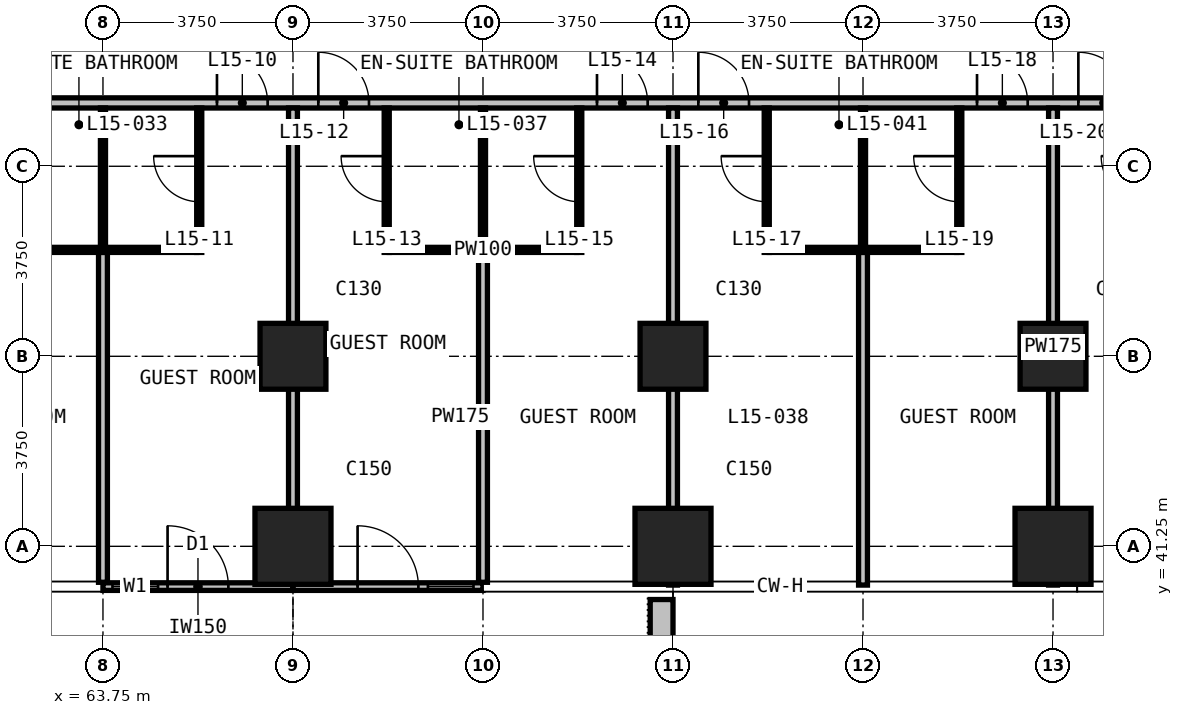
"""IFC4 building model, lengths in metres.
Left out: names, types, materials, properties, quantities, classifications, styles, units other than length and angle.
Written with IfcOpenShell. Run it as: python <this file> out.ifc"""

import sys

from ifc_helpers import new_model, si_unit, direction, frame, frame_2d, origin, origin_2d, place, context, subcontext, project, spatial, rectangle, extrude, element, fill, save


model = new_model("IFC4")
c1 = context("Model", 3, precision=1e-05, world=origin(), true_north=direction((0.0, 1.0)))
c2 = subcontext(c1, "Body", "Model", "MODEL_VIEW")
j1 = project(units=[si_unit("LENGTHUNIT", "METRE"), si_unit("PLANEANGLEUNIT", "RADIAN")], contexts=[c1])
p1 = place(None, origin())
s1 = spatial("IfcSite", under=j1, at=p1, CompositionType="ELEMENT")
p2 = place(p1, origin())
s2 = spatial("IfcBuilding", under=s1, at=p2, CompositionType="ELEMENT")
p3 = place(p2, frame((0.0, 0.0, 69.2)))
s3 = spatial("IfcBuildingStorey", under=s2, at=p3, CompositionType="ELEMENT", Elevation=69.2)
p4 = place(p3, frame((67.5, 41.25, 0.0), z_axis=(0.0, 0.0, 1.0), x_axis=(1.0, 0.0, 0.0)))
e1 = element("IfcColumn", 1, at=p4, inside=s3, PredefinedType="COLUMN", context=c2, shape_type="SweptSolid", body=[
    extrude(rectangle(XDim=1.5, YDim=1.5, at=origin_2d()), origin(), (0.0, 0.0, 1.0), 3.3),
])
p5 = place(p3, frame((67.5, 45.0, 0.0), z_axis=(0.0, 0.0, 1.0), x_axis=(1.0, 0.0, 0.0)))
e2 = element("IfcColumn", 2, at=p5, inside=s3, PredefinedType="COLUMN", context=c2, shape_type="SweptSolid", body=[
    extrude(rectangle(XDim=1.3, YDim=1.3, at=origin_2d()), origin(), (0.0, 0.0, 1.0), 3.3),
])
p6 = place(p3, frame((75.0, 41.25, 0.0), z_axis=(0.0, 0.0, 1.0), x_axis=(1.0, 0.0, 0.0)))
e3 = element("IfcColumn", 3, at=p6, inside=s3, PredefinedType="COLUMN", context=c2, shape_type="SweptSolid", body=[
    extrude(rectangle(XDim=1.5, YDim=1.5, at=origin_2d()), origin(), (0.0, 0.0, 1.0), 3.3),
])
p7 = place(p3, frame((75.0, 45.0, 0.0), z_axis=(0.0, 0.0, 1.0), x_axis=(1.0, 0.0, 0.0)))
e4 = element("IfcColumn", 4, at=p7, inside=s3, PredefinedType="COLUMN", context=c2, shape_type="SweptSolid", body=[
    extrude(rectangle(XDim=1.3, YDim=1.3, at=origin_2d()), origin(), (0.0, 0.0, 1.0), 3.3),
])
p8 = place(p3, frame((82.5, 41.25, 0.0), z_axis=(0.0, 0.0, 1.0), x_axis=(1.0, 0.0, 0.0)))
e5 = element("IfcColumn", 5, at=p8, inside=s3, PredefinedType="COLUMN", context=c2, shape_type="SweptSolid", body=[
    extrude(rectangle(XDim=1.5, YDim=1.5, at=origin_2d()), origin(), (0.0, 0.0, 1.0), 3.3),
])
p9 = place(p3, frame((82.5, 45.0, 0.0), z_axis=(0.0, 0.0, 1.0), x_axis=(1.0, 0.0, 0.0)))
e6 = element("IfcColumn", 6, at=p9, inside=s3, PredefinedType="COLUMN", context=c2, shape_type="SweptSolid", body=[
    extrude(rectangle(XDim=1.3, YDim=1.3, at=origin_2d()), origin(), (0.0, 0.0, 1.0), 3.3),
])
p10 = place(p3, frame((63.75, 40.455, 0.0), z_axis=(0.0, 0.0, 1.0), x_axis=(1.0, 0.0, 0.0)))
e7 = element("IfcWall", 7, at=p10, inside=s3, PredefinedType="SOLIDWALL", context=c2, shape_type="SweptSolid", body=[
    extrude(rectangle(XDim=3.75, YDim=0.15, at=frame_2d((1.875, 0.0))), origin(), (0.0, 0.0, 1.0), 3.0),
])
p11 = place(p10, frame((0.188, 0.0, 0.1)))
e8 = element("IfcOpeningElement", 8, at=p11, cuts=e7, PredefinedType="OPENING", context=c2, shape_type="SweptSolid", body=[
    extrude(rectangle(XDim=0.9, YDim=2.4, at=frame_2d((0.45, 1.2))), frame((0.0, 0.085, 0.0), z_axis=(0.0, -1.0, 0.0), x_axis=(1.0, 0.0, 0.0)), (0.0, 0.0, 1.0), 0.17),
])
p12 = place(p10, frame((1.275, 0.0, 0.0)))
e9 = element("IfcOpeningElement", 9, at=p12, cuts=e7, PredefinedType="OPENING", context=c2, shape_type="SweptSolid", body=[
    extrude(rectangle(XDim=1.2, YDim=2.4, at=frame_2d((0.6, 1.2))), frame((0.0, 0.085, 0.0), z_axis=(0.0, -1.0, 0.0), x_axis=(1.0, 0.0, 0.0)), (0.0, 0.0, 1.0), 0.17),
])
p13 = place(p3, frame((67.5, 40.455, 0.0), z_axis=(0.0, 0.0, 1.0), x_axis=(1.0, 0.0, 0.0)))
e10 = element("IfcWall", 10, at=p13, inside=s3, PredefinedType="SOLIDWALL", context=c2, shape_type="SweptSolid", body=[
    extrude(rectangle(XDim=3.75, YDim=0.15, at=frame_2d((1.875, 0.0))), origin(), (0.0, 0.0, 1.0), 3.0),
])
p14 = place(p13, frame((1.275, 0.0, 0.0)))
e11 = element("IfcOpeningElement", 11, at=p14, cuts=e10, PredefinedType="OPENING", context=c2, shape_type="SweptSolid", body=[
    extrude(rectangle(XDim=1.2, YDim=2.4, at=frame_2d((0.6, 1.2))), frame((0.0, 0.085, 0.0), z_axis=(0.0, -1.0, 0.0), x_axis=(1.0, 0.0, 0.0)), (0.0, 0.0, 1.0), 0.17),
])
p15 = place(p13, frame((2.663, 0.0, 0.1)))
e12 = element("IfcOpeningElement", 12, at=p15, cuts=e10, PredefinedType="OPENING", context=c2, shape_type="SweptSolid", body=[
    extrude(rectangle(XDim=0.9, YDim=2.4, at=frame_2d((0.45, 1.2))), frame((0.0, 0.085, 0.0), z_axis=(0.0, -1.0, 0.0), x_axis=(1.0, 0.0, 0.0)), (0.0, 0.0, 1.0), 0.17),
])
p16 = place(p3, frame((74.775, 40.2, 0.0), z_axis=(0.0, 0.0, 1.0), x_axis=(0.0, -1.0, 0.0)))
e13 = element("IfcWall", 13, at=p16, inside=s3, PredefinedType="USERDEFINED", context=c2, shape_type="SweptSolid", body=[
    extrude(rectangle(XDim=2.35, YDim=0.45, at=frame_2d((1.175, 0.0))), origin(), (0.0, 0.0, 1.0), 1.1),
])
p17 = place(p3, frame((52.575, 50.0, 0.0), z_axis=(0.0, 0.0, 1.0), x_axis=(1.0, 0.0, 0.0)))
e14 = element("IfcWall", 14, at=p17, inside=s3, PredefinedType="PARTITIONING", context=c2, shape_type="SweptSolid", body=[
    extrude(rectangle(XDim=44.85, YDim=0.2, at=frame_2d((22.425, 0.0))), origin(), (0.0, 0.0, 1.0), 3.0),
])
p18 = place(p17, frame((5.925, 0.0, 0.0)))
e15 = element("IfcOpeningElement", 15, at=p18, cuts=e14, PredefinedType="OPENING", context=c2, shape_type="SweptSolid", body=[
    extrude(rectangle(XDim=1.0, YDim=2.2, at=frame_2d((0.5, 1.1))), frame((0.0, 0.11, 0.0), z_axis=(0.0, -1.0, 0.0), x_axis=(1.0, 0.0, 0.0)), (0.0, 0.0, 1.0), 0.22),
])
p19 = place(p17, frame((7.925, 0.0, 0.0)))
e16 = element("IfcOpeningElement", 16, at=p19, cuts=e14, PredefinedType="OPENING", context=c2, shape_type="SweptSolid", body=[
    extrude(rectangle(XDim=1.0, YDim=2.2, at=frame_2d((0.5, 1.1))), frame((0.0, 0.11, 0.0), z_axis=(0.0, -1.0, 0.0), x_axis=(1.0, 0.0, 0.0)), (0.0, 0.0, 1.0), 0.22),
])
p20 = place(p17, frame((13.425, 0.0, 0.0)))
e17 = element("IfcOpeningElement", 17, at=p20, cuts=e14, PredefinedType="OPENING", context=c2, shape_type="SweptSolid", body=[
    extrude(rectangle(XDim=1.0, YDim=2.2, at=frame_2d((0.5, 1.1))), frame((0.0, 0.11, 0.0), z_axis=(0.0, -1.0, 0.0), x_axis=(1.0, 0.0, 0.0)), (0.0, 0.0, 1.0), 0.22),
])
p21 = place(p17, frame((15.425, 0.0, 0.0)))
e18 = element("IfcOpeningElement", 18, at=p21, cuts=e14, PredefinedType="OPENING", context=c2, shape_type="SweptSolid", body=[
    extrude(rectangle(XDim=1.0, YDim=2.2, at=frame_2d((0.5, 1.1))), frame((0.0, 0.11, 0.0), z_axis=(0.0, -1.0, 0.0), x_axis=(1.0, 0.0, 0.0)), (0.0, 0.0, 1.0), 0.22),
])
p22 = place(p17, frame((20.925, 0.0, 0.0)))
e19 = element("IfcOpeningElement", 19, at=p22, cuts=e14, PredefinedType="OPENING", context=c2, shape_type="SweptSolid", body=[
    extrude(rectangle(XDim=1.0, YDim=2.2, at=frame_2d((0.5, 1.1))), frame((0.0, 0.11, 0.0), z_axis=(0.0, -1.0, 0.0), x_axis=(1.0, 0.0, 0.0)), (0.0, 0.0, 1.0), 0.22),
])
p23 = place(p17, frame((22.925, 0.0, 0.0)))
e20 = element("IfcOpeningElement", 20, at=p23, cuts=e14, PredefinedType="OPENING", context=c2, shape_type="SweptSolid", body=[
    extrude(rectangle(XDim=1.0, YDim=2.2, at=frame_2d((0.5, 1.1))), frame((0.0, 0.11, 0.0), z_axis=(0.0, -1.0, 0.0), x_axis=(1.0, 0.0, 0.0)), (0.0, 0.0, 1.0), 0.22),
])
p24 = place(p17, frame((28.425, 0.0, 0.0)))
e21 = element("IfcOpeningElement", 21, at=p24, cuts=e14, PredefinedType="OPENING", context=c2, shape_type="SweptSolid", body=[
    extrude(rectangle(XDim=1.0, YDim=2.2, at=frame_2d((0.5, 1.1))), frame((0.0, 0.11, 0.0), z_axis=(0.0, -1.0, 0.0), x_axis=(1.0, 0.0, 0.0)), (0.0, 0.0, 1.0), 0.22),
])
p25 = place(p17, frame((30.425, 0.0, 0.0)))
e22 = element("IfcOpeningElement", 22, at=p25, cuts=e14, PredefinedType="OPENING", context=c2, shape_type="SweptSolid", body=[
    extrude(rectangle(XDim=1.0, YDim=2.2, at=frame_2d((0.5, 1.1))), frame((0.0, 0.11, 0.0), z_axis=(0.0, -1.0, 0.0), x_axis=(1.0, 0.0, 0.0)), (0.0, 0.0, 1.0), 0.22),
])
p26 = place(p17, frame((35.925, 0.0, 0.0)))
e23 = element("IfcOpeningElement", 23, at=p26, cuts=e14, PredefinedType="OPENING", context=c2, shape_type="SweptSolid", body=[
    extrude(rectangle(XDim=1.0, YDim=2.2, at=frame_2d((0.5, 1.1))), frame((0.0, 0.11, 0.0), z_axis=(0.0, -1.0, 0.0), x_axis=(1.0, 0.0, 0.0)), (0.0, 0.0, 1.0), 0.22),
])
p27 = place(p17, frame((37.925, 0.0, 0.0)))
e24 = element("IfcOpeningElement", 24, at=p27, cuts=e14, PredefinedType="OPENING", context=c2, shape_type="SweptSolid", body=[
    extrude(rectangle(XDim=1.0, YDim=2.2, at=frame_2d((0.5, 1.1))), frame((0.0, 0.11, 0.0), z_axis=(0.0, -1.0, 0.0), x_axis=(1.0, 0.0, 0.0)), (0.0, 0.0, 1.0), 0.22),
])
p28 = place(p17, frame((1.4, 0.0, 0.0)))
e25 = element("IfcOpeningElement", 25, at=p28, cuts=e14, PredefinedType="OPENING", context=c2, shape_type="SweptSolid", body=[
    extrude(rectangle(XDim=0.9, YDim=2.2, at=frame_2d((0.45, 1.1))), frame((0.0, 0.11, 0.0), z_axis=(0.0, -1.0, 0.0), x_axis=(1.0, 0.0, 0.0)), (0.0, 0.0, 1.0), 0.22),
])
p29 = place(p17, frame((42.575, 0.0, 0.0)))
e26 = element("IfcOpeningElement", 26, at=p29, cuts=e14, PredefinedType="OPENING", context=c2, shape_type="SweptSolid", body=[
    extrude(rectangle(XDim=0.9, YDim=2.2, at=frame_2d((0.45, 1.1))), frame((0.0, 0.11, 0.0), z_axis=(0.0, -1.0, 0.0), x_axis=(1.0, 0.0, 0.0)), (0.0, 0.0, 1.0), 0.22),
])
p30 = place(p3, frame((63.75, 40.54, 0.0), z_axis=(0.0, 0.0, 1.0), x_axis=(0.0, 1.0, 0.0)))
e27 = element("IfcWall", 27, at=p30, inside=s3, PredefinedType="PARTITIONING", context=c2, shape_type="SweptSolid", body=[
    extrude(rectangle(XDim=6.51, YDim=0.175, at=frame_2d((3.255, 0.0))), origin(), (0.0, 0.0, 1.0), 3.0),
])
p31 = place(p3, frame((67.5, 40.54, 0.0), z_axis=(0.0, 0.0, 1.0), x_axis=(0.0, 1.0, 0.0)))
e28 = element("IfcWall", 28, at=p31, inside=s3, PredefinedType="PARTITIONING", context=c2, shape_type="SweptSolid", body=[
    extrude(rectangle(XDim=9.36, YDim=0.175, at=frame_2d((4.68, 0.0))), origin(), (0.0, 0.0, 1.0), 3.0),
])
p32 = place(p3, frame((71.25, 40.54, 0.0), z_axis=(0.0, 0.0, 1.0), x_axis=(0.0, 1.0, 0.0)))
e29 = element("IfcWall", 29, at=p32, inside=s3, PredefinedType="PARTITIONING", context=c2, shape_type="SweptSolid", body=[
    extrude(rectangle(XDim=6.51, YDim=0.175, at=frame_2d((3.255, 0.0))), origin(), (0.0, 0.0, 1.0), 3.0),
])
p33 = place(p3, frame((75.0, 40.485, 0.0), z_axis=(0.0, 0.0, 1.0), x_axis=(0.0, 1.0, 0.0)))
e30 = element("IfcWall", 30, at=p33, inside=s3, PredefinedType="PARTITIONING", context=c2, shape_type="SweptSolid", body=[
    extrude(rectangle(XDim=9.415, YDim=0.175, at=frame_2d((4.708, 0.0))), origin(), (0.0, 0.0, 1.0), 3.0),
])
p34 = place(p3, frame((78.75, 40.485, 0.0), z_axis=(0.0, 0.0, 1.0), x_axis=(0.0, 1.0, 0.0)))
e31 = element("IfcWall", 31, at=p34, inside=s3, PredefinedType="PARTITIONING", context=c2, shape_type="SweptSolid", body=[
    extrude(rectangle(XDim=6.565, YDim=0.175, at=frame_2d((3.282, 0.0))), origin(), (0.0, 0.0, 1.0), 3.0),
])
p35 = place(p3, frame((82.5, 40.485, 0.0), z_axis=(0.0, 0.0, 1.0), x_axis=(0.0, 1.0, 0.0)))
e32 = element("IfcWall", 32, at=p35, inside=s3, PredefinedType="PARTITIONING", context=c2, shape_type="SweptSolid", body=[
    extrude(rectangle(XDim=9.415, YDim=0.175, at=frame_2d((4.708, 0.0))), origin(), (0.0, 0.0, 1.0), 3.0),
])
for number, where, z_axis, x_axis in (
    (33, (61.9, 47.1, 0.0), (0.0, 0.0, 1.0), (1.0, 0.0, 0.0)),
    (34, (69.4, 47.1, 0.0), (0.0, 0.0, 1.0), (1.0, 0.0, 0.0)),
    (35, (76.9, 47.1, 0.0), (0.0, 0.0, 1.0), (1.0, 0.0, 0.0)),
):
    element("IfcWall", number, at=place(p3, frame(where, z_axis=z_axis, x_axis=x_axis)), inside=s3, PredefinedType="PARTITIONING", context=c2, shape_type="SweptSolid", body=[
        extrude(rectangle(XDim=3.7, YDim=0.1, at=frame_2d((1.85, 0.0))), origin(), (0.0, 0.0, 1.0), 3.0),
    ])
p36 = place(p3, frame((63.75, 47.15, 0.0), z_axis=(0.0, 0.0, 1.0), x_axis=(0.0, 1.0, 0.0)))
e36 = element("IfcWall", 36, at=p36, inside=s3, PredefinedType="PARTITIONING", context=c2, shape_type="SweptSolid", body=[
    extrude(rectangle(XDim=2.75, YDim=0.1, at=frame_2d((1.375, 0.0))), origin(), (0.0, 0.0, 1.0), 3.0),
])
p37 = place(p3, frame((65.65, 47.05, 0.0), z_axis=(0.0, 0.0, 1.0), x_axis=(0.0, 1.0, 0.0)))
e37 = element("IfcWall", 37, at=p37, inside=s3, PredefinedType="PARTITIONING", context=c2, shape_type="SweptSolid", body=[
    extrude(rectangle(XDim=2.85, YDim=0.1, at=frame_2d((1.425, 0.0))), origin(), (0.0, 0.0, 1.0), 3.0),
])
p38 = place(p37, frame((1.0, 0.0, 0.0)))
e38 = element("IfcOpeningElement", 38, at=p38, cuts=e37, PredefinedType="OPENING", context=c2, shape_type="SweptSolid", body=[
    extrude(rectangle(XDim=0.9, YDim=2.2, at=frame_2d((0.45, 1.1))), frame((0.0, 0.06, 0.0), z_axis=(0.0, -1.0, 0.0), x_axis=(1.0, 0.0, 0.0)), (0.0, 0.0, 1.0), 0.12),
])
p39 = place(p3, frame((69.35, 47.05, 0.0), z_axis=(0.0, 0.0, 1.0), x_axis=(0.0, 1.0, 0.0)))
e39 = element("IfcWall", 39, at=p39, inside=s3, PredefinedType="PARTITIONING", context=c2, shape_type="SweptSolid", body=[
    extrude(rectangle(XDim=2.85, YDim=0.1, at=frame_2d((1.425, 0.0))), origin(), (0.0, 0.0, 1.0), 3.0),
])
p40 = place(p39, frame((1.0, 0.0, 0.0)))
e40 = element("IfcOpeningElement", 40, at=p40, cuts=e39, PredefinedType="OPENING", context=c2, shape_type="SweptSolid", body=[
    extrude(rectangle(XDim=0.9, YDim=2.2, at=frame_2d((0.45, 1.1))), frame((0.0, 0.06, 0.0), z_axis=(0.0, -1.0, 0.0), x_axis=(1.0, 0.0, 0.0)), (0.0, 0.0, 1.0), 0.12),
])
p41 = place(p3, frame((71.25, 47.15, 0.0), z_axis=(0.0, 0.0, 1.0), x_axis=(0.0, 1.0, 0.0)))
e41 = element("IfcWall", 41, at=p41, inside=s3, PredefinedType="PARTITIONING", context=c2, shape_type="SweptSolid", body=[
    extrude(rectangle(XDim=2.75, YDim=0.1, at=frame_2d((1.375, 0.0))), origin(), (0.0, 0.0, 1.0), 3.0),
])
p42 = place(p3, frame((73.15, 47.05, 0.0), z_axis=(0.0, 0.0, 1.0), x_axis=(0.0, 1.0, 0.0)))
e42 = element("IfcWall", 42, at=p42, inside=s3, PredefinedType="PARTITIONING", context=c2, shape_type="SweptSolid", body=[
    extrude(rectangle(XDim=2.85, YDim=0.1, at=frame_2d((1.425, 0.0))), origin(), (0.0, 0.0, 1.0), 3.0),
])
p43 = place(p42, frame((1.0, 0.0, 0.0)))
e43 = element("IfcOpeningElement", 43, at=p43, cuts=e42, PredefinedType="OPENING", context=c2, shape_type="SweptSolid", body=[
    extrude(rectangle(XDim=0.9, YDim=2.2, at=frame_2d((0.45, 1.1))), frame((0.0, 0.06, 0.0), z_axis=(0.0, -1.0, 0.0), x_axis=(1.0, 0.0, 0.0)), (0.0, 0.0, 1.0), 0.12),
])
p44 = place(p3, frame((76.85, 47.05, 0.0), z_axis=(0.0, 0.0, 1.0), x_axis=(0.0, 1.0, 0.0)))
e44 = element("IfcWall", 44, at=p44, inside=s3, PredefinedType="PARTITIONING", context=c2, shape_type="SweptSolid", body=[
    extrude(rectangle(XDim=2.85, YDim=0.1, at=frame_2d((1.425, 0.0))), origin(), (0.0, 0.0, 1.0), 3.0),
])
p45 = place(p44, frame((1.0, 0.0, 0.0)))
e45 = element("IfcOpeningElement", 45, at=p45, cuts=e44, PredefinedType="OPENING", context=c2, shape_type="SweptSolid", body=[
    extrude(rectangle(XDim=0.9, YDim=2.2, at=frame_2d((0.45, 1.1))), frame((0.0, 0.06, 0.0), z_axis=(0.0, -1.0, 0.0), x_axis=(1.0, 0.0, 0.0)), (0.0, 0.0, 1.0), 0.12),
])
p46 = place(p3, frame((78.75, 47.15, 0.0), z_axis=(0.0, 0.0, 1.0), x_axis=(0.0, 1.0, 0.0)))
e46 = element("IfcWall", 46, at=p46, inside=s3, PredefinedType="PARTITIONING", context=c2, shape_type="SweptSolid", body=[
    extrude(rectangle(XDim=2.75, YDim=0.1, at=frame_2d((1.375, 0.0))), origin(), (0.0, 0.0, 1.0), 3.0),
])
p47 = place(p3, frame((80.65, 47.05, 0.0), z_axis=(0.0, 0.0, 1.0), x_axis=(0.0, 1.0, 0.0)))
e47 = element("IfcWall", 47, at=p47, inside=s3, PredefinedType="PARTITIONING", context=c2, shape_type="SweptSolid", body=[
    extrude(rectangle(XDim=2.85, YDim=0.1, at=frame_2d((1.425, 0.0))), origin(), (0.0, 0.0, 1.0), 3.0),
])
p48 = place(p47, frame((1.0, 0.0, 0.0)))
e48 = element("IfcOpeningElement", 48, at=p48, cuts=e47, PredefinedType="OPENING", context=c2, shape_type="SweptSolid", body=[
    extrude(rectangle(XDim=0.9, YDim=2.2, at=frame_2d((0.45, 1.1))), frame((0.0, 0.06, 0.0), z_axis=(0.0, -1.0, 0.0), x_axis=(1.0, 0.0, 0.0)), (0.0, 0.0, 1.0), 0.12),
])
p49 = place(p11, origin())
e49 = element("IfcWindow", 49, at=p49, inside=s3, PartitioningType="SINGLE_PANEL", PredefinedType="WINDOW", context=c2, shape_type="SweptSolid", body=[
    extrude(rectangle(XDim=0.9, YDim=2.4, at=frame_2d((0.45, 1.2))), frame((0.0, 0.03, 0.0), z_axis=(0.0, -1.0, 0.0), x_axis=(1.0, 0.0, 0.0)), (0.0, 0.0, 1.0), 0.06),
])
fill(e8, e49)
p50 = place(p12, origin())
e50 = element("IfcDoor", 50, at=p50, inside=s3, OperationType="SINGLE_SWING_LEFT", PredefinedType="DOOR", context=c2, shape_type="SweptSolid", body=[
    extrude(rectangle(XDim=1.2, YDim=2.4, at=frame_2d((0.6, 1.2))), frame((0.0, 0.025, 0.0), z_axis=(0.0, -1.0, 0.0), x_axis=(1.0, 0.0, 0.0)), (0.0, 0.0, 1.0), 0.05),
])
fill(e9, e50)
p51 = place(p14, origin())
e51 = element("IfcDoor", 51, at=p51, inside=s3, OperationType="SINGLE_SWING_LEFT", PredefinedType="DOOR", context=c2, shape_type="SweptSolid", body=[
    extrude(rectangle(XDim=1.2, YDim=2.4, at=frame_2d((0.6, 1.2))), frame((0.0, 0.025, 0.0), z_axis=(0.0, -1.0, 0.0), x_axis=(1.0, 0.0, 0.0)), (0.0, 0.0, 1.0), 0.05),
])
fill(e11, e51)
p52 = place(p15, origin())
e52 = element("IfcWindow", 52, at=p52, inside=s3, PartitioningType="SINGLE_PANEL", PredefinedType="WINDOW", context=c2, shape_type="SweptSolid", body=[
    extrude(rectangle(XDim=0.9, YDim=2.4, at=frame_2d((0.45, 1.2))), frame((0.0, 0.03, 0.0), z_axis=(0.0, -1.0, 0.0), x_axis=(1.0, 0.0, 0.0)), (0.0, 0.0, 1.0), 0.06),
])
fill(e12, e52)
p53 = place(p20, origin())
e53 = element("IfcDoor", 53, at=p53, inside=s3, OperationType="SINGLE_SWING_LEFT", PredefinedType="DOOR", context=c2, shape_type="SweptSolid", body=[
    extrude(rectangle(XDim=1.0, YDim=2.2, at=frame_2d((0.5, 1.1))), frame((0.0, 0.025, 0.0), z_axis=(0.0, -1.0, 0.0), x_axis=(1.0, 0.0, 0.0)), (0.0, 0.0, 1.0), 0.05),
])
fill(e17, e53)
p54 = place(p38, origin())
e54 = element("IfcDoor", 54, at=p54, inside=s3, OperationType="SINGLE_SWING_RIGHT", PredefinedType="DOOR", context=c2, shape_type="SweptSolid", body=[
    extrude(rectangle(XDim=0.9, YDim=2.2, at=frame_2d((0.45, 1.1))), frame((0.0, 0.025, 0.0), z_axis=(0.0, -1.0, 0.0), x_axis=(1.0, 0.0, 0.0)), (0.0, 0.0, 1.0), 0.05),
])
fill(e38, e54)
p55 = place(p21, origin())
e55 = element("IfcDoor", 55, at=p55, inside=s3, OperationType="SINGLE_SWING_LEFT", PredefinedType="DOOR", context=c2, shape_type="SweptSolid", body=[
    extrude(rectangle(XDim=1.0, YDim=2.2, at=frame_2d((0.5, 1.1))), frame((0.0, 0.025, 0.0), z_axis=(0.0, -1.0, 0.0), x_axis=(1.0, 0.0, 0.0)), (0.0, 0.0, 1.0), 0.05),
])
fill(e18, e55)
p56 = place(p40, origin())
e56 = element("IfcDoor", 56, at=p56, inside=s3, OperationType="SINGLE_SWING_RIGHT", PredefinedType="DOOR", context=c2, shape_type="SweptSolid", body=[
    extrude(rectangle(XDim=0.9, YDim=2.2, at=frame_2d((0.45, 1.1))), frame((0.0, 0.025, 0.0), z_axis=(0.0, -1.0, 0.0), x_axis=(1.0, 0.0, 0.0)), (0.0, 0.0, 1.0), 0.05),
])
fill(e40, e56)
p57 = place(p22, origin())
e57 = element("IfcDoor", 57, at=p57, inside=s3, OperationType="SINGLE_SWING_LEFT", PredefinedType="DOOR", context=c2, shape_type="SweptSolid", body=[
    extrude(rectangle(XDim=1.0, YDim=2.2, at=frame_2d((0.5, 1.1))), frame((0.0, 0.025, 0.0), z_axis=(0.0, -1.0, 0.0), x_axis=(1.0, 0.0, 0.0)), (0.0, 0.0, 1.0), 0.05),
])
fill(e19, e57)
p58 = place(p43, origin())
e58 = element("IfcDoor", 58, at=p58, inside=s3, OperationType="SINGLE_SWING_RIGHT", PredefinedType="DOOR", context=c2, shape_type="SweptSolid", body=[
    extrude(rectangle(XDim=0.9, YDim=2.2, at=frame_2d((0.45, 1.1))), frame((0.0, 0.025, 0.0), z_axis=(0.0, -1.0, 0.0), x_axis=(1.0, 0.0, 0.0)), (0.0, 0.0, 1.0), 0.05),
])
fill(e43, e58)
p59 = place(p23, origin())
e59 = element("IfcDoor", 59, at=p59, inside=s3, OperationType="SINGLE_SWING_RIGHT", PredefinedType="DOOR", context=c2, shape_type="SweptSolid", body=[
    extrude(rectangle(XDim=1.0, YDim=2.2, at=frame_2d((0.5, 1.1))), frame((0.0, 0.025, 0.0), z_axis=(0.0, -1.0, 0.0), x_axis=(1.0, 0.0, 0.0)), (0.0, 0.0, 1.0), 0.05),
])
fill(e20, e59)
p60 = place(p45, origin())
e60 = element("IfcDoor", 60, at=p60, inside=s3, OperationType="SINGLE_SWING_RIGHT", PredefinedType="DOOR", context=c2, shape_type="SweptSolid", body=[
    extrude(rectangle(XDim=0.9, YDim=2.2, at=frame_2d((0.45, 1.1))), frame((0.0, 0.025, 0.0), z_axis=(0.0, -1.0, 0.0), x_axis=(1.0, 0.0, 0.0)), (0.0, 0.0, 1.0), 0.05),
])
fill(e45, e60)
p61 = place(p24, origin())
e61 = element("IfcDoor", 61, at=p61, inside=s3, OperationType="SINGLE_SWING_RIGHT", PredefinedType="DOOR", context=c2, shape_type="SweptSolid", body=[
    extrude(rectangle(XDim=1.0, YDim=2.2, at=frame_2d((0.5, 1.1))), frame((0.0, 0.025, 0.0), z_axis=(0.0, -1.0, 0.0), x_axis=(1.0, 0.0, 0.0)), (0.0, 0.0, 1.0), 0.05),
])
fill(e21, e61)
p62 = place(p48, origin())
e62 = element("IfcDoor", 62, at=p62, inside=s3, OperationType="SINGLE_SWING_RIGHT", PredefinedType="DOOR", context=c2, shape_type="SweptSolid", body=[
    extrude(rectangle(XDim=0.9, YDim=2.2, at=frame_2d((0.45, 1.1))), frame((0.0, 0.025, 0.0), z_axis=(0.0, -1.0, 0.0), x_axis=(1.0, 0.0, 0.0)), (0.0, 0.0, 1.0), 0.05),
])
fill(e48, e62)
p63 = place(p25, origin())
e63 = element("IfcDoor", 63, at=p63, inside=s3, OperationType="SINGLE_SWING_RIGHT", PredefinedType="DOOR", context=c2, shape_type="SweptSolid", body=[
    extrude(rectangle(XDim=1.0, YDim=2.2, at=frame_2d((0.5, 1.1))), frame((0.0, 0.025, 0.0), z_axis=(0.0, -1.0, 0.0), x_axis=(1.0, 0.0, 0.0)), (0.0, 0.0, 1.0), 0.05),
])
fill(e22, e63)
save(model, sys.argv[1])
